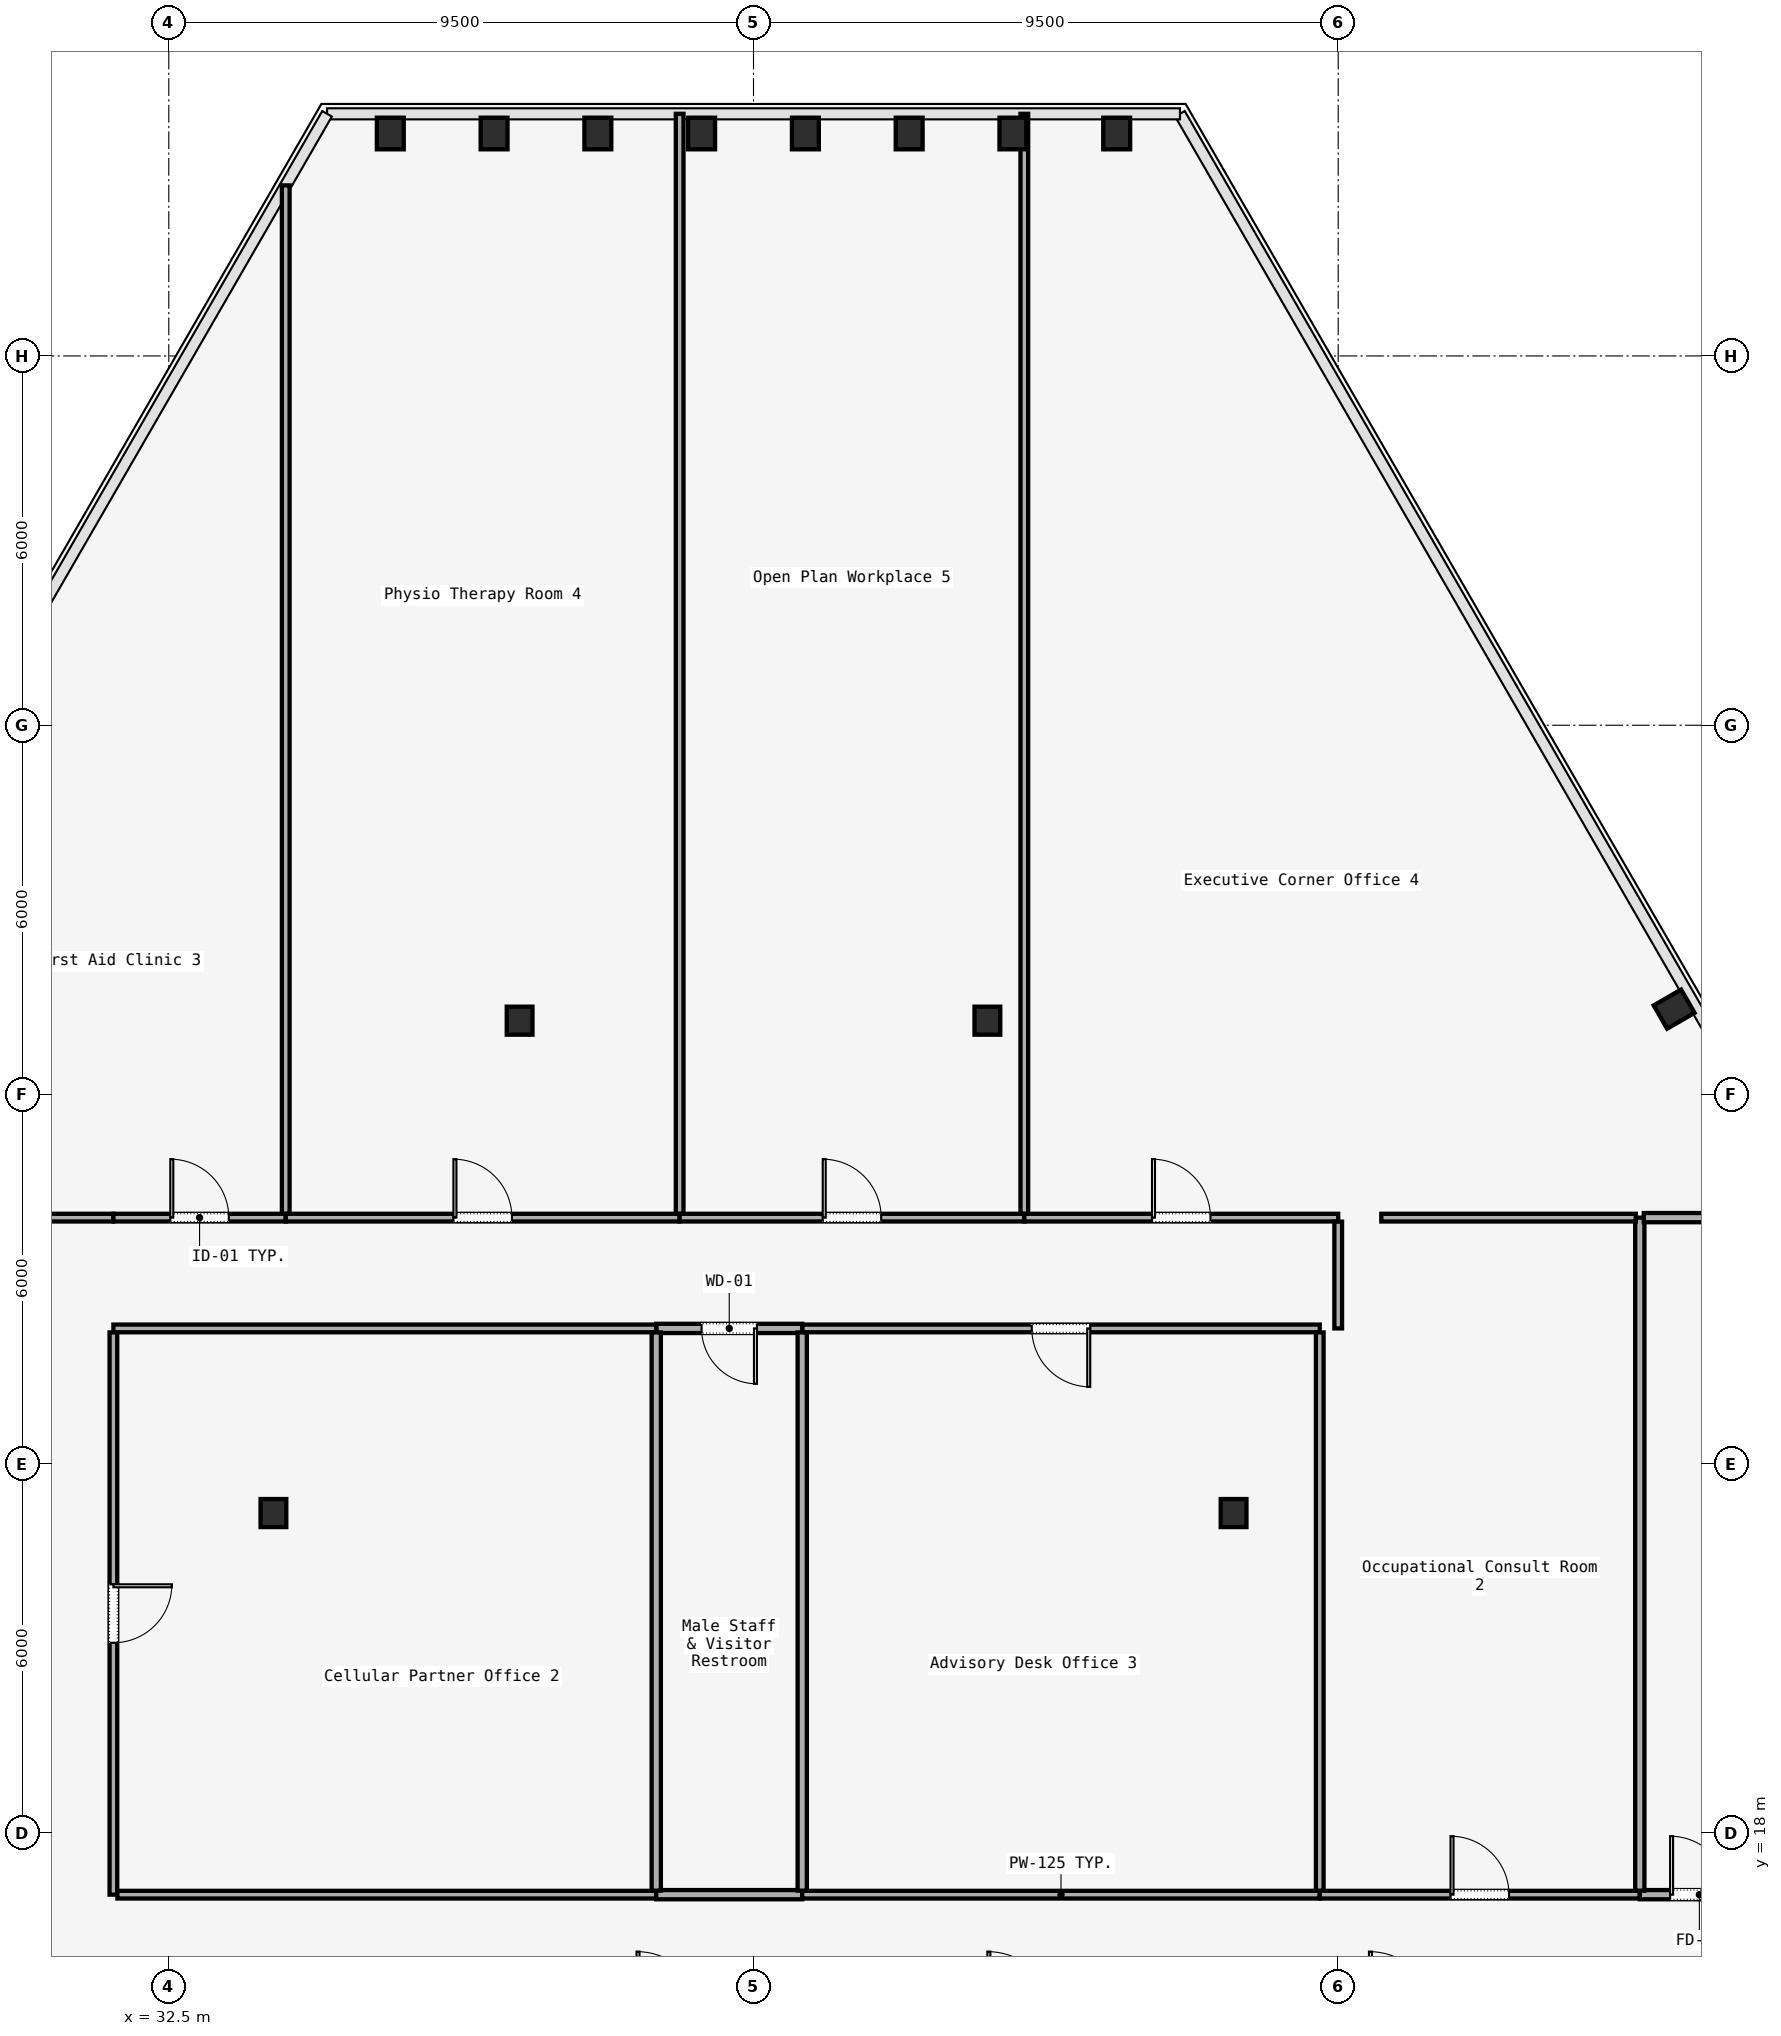
"""IFC4 building model, lengths in metres.
Left out: names, types, materials, properties, quantities, classifications, styles, units other than length and angle.
Written with IfcOpenShell. Run it as: python <this file> out.ifc"""

import sys

from ifc_helpers import new_model, si_unit, direction, frame, frame_2d, origin, origin_2d, place, context, subcontext, project, spatial, rectangle, i_section, extrude, element, fill, save


model = new_model("IFC4")
c1 = context("Model", 3, precision=1e-05, world=origin(), true_north=direction((0.0, 1.0)))
c2 = subcontext(c1, "Body", "Model", "MODEL_VIEW")
j1 = project(units=[si_unit("LENGTHUNIT", "METRE"), si_unit("PLANEANGLEUNIT", "RADIAN")], contexts=[c1])
p1 = place(None, origin())
s1 = spatial("IfcSite", under=j1, at=p1, CompositionType="ELEMENT")
p2 = place(p1, origin())
s2 = spatial("IfcBuilding", under=s1, at=p2, CompositionType="ELEMENT")
p3 = place(p2, frame((0.0, 0.0, 93.0)))
s3 = spatial("IfcBuildingStorey", under=s2, at=p3, CompositionType="ELEMENT", Elevation=93.0)
for number, where, z_axis, x_axis in (
    (1, (34.2, 23.2, 0.0), (0.0, 0.0, 1.0), (1.0, 0.0, 0.0)),
    (2, (49.8, 23.2, 0.0), (0.0, 0.0, 1.0), (1.0, 0.0, 0.0)),
    (3, (38.2, 31.2, 0.0), (0.0, 0.0, 1.0), (1.0, 0.0, 0.0)),
    (4, (45.8, 31.2, 0.0), (0.0, 0.0, 1.0), (1.0, 0.0, 0.0)),
):
    element("IfcColumn", number, at=place(p3, frame(where, z_axis=z_axis, x_axis=x_axis)), inside=s3, PredefinedType="COLUMN", context=c2, shape_type="SweptSolid", body=[
        extrude(i_section(OverallWidth=0.418, OverallDepth=0.456, WebThickness=0.042, FlangeThickness=0.067, FilletRadius=0.015, at=origin_2d()), origin(), (0.0, 0.0, 1.0), 3.58),
    ])
for number, where, z_axis, x_axis in (
    (5, (56.958, 31.387, 0.0), (0.0, 0.0, 1.0), (-0.5, 0.866, 0.0)),
    (6, (47.901, 45.614, 0.0), (0.0, 0.0, 1.0), (1.0, 0.0, 0.0)),
    (7, (46.215, 45.614, 0.0), (0.0, 0.0, 1.0), (1.0, 0.0, 0.0)),
    (8, (44.529, 45.614, 0.0), (0.0, 0.0, 1.0), (1.0, 0.0, 0.0)),
    (9, (42.843, 45.614, 0.0), (0.0, 0.0, 1.0), (1.0, 0.0, 0.0)),
    (10, (41.157, 45.614, 0.0), (0.0, 0.0, 1.0), (1.0, 0.0, 0.0)),
    (11, (39.471, 45.614, 0.0), (0.0, 0.0, 1.0), (1.0, 0.0, 0.0)),
    (12, (37.785, 45.614, 0.0), (0.0, 0.0, 1.0), (1.0, 0.0, 0.0)),
    (13, (36.099, 45.614, 0.0), (0.0, 0.0, 1.0), (1.0, 0.0, 0.0)),
):
    element("IfcColumn", number, at=place(p3, frame(where, z_axis=z_axis, x_axis=x_axis)), inside=s3, PredefinedType="COLUMN", context=c2, shape_type="SweptSolid", body=[
        extrude(i_section(OverallWidth=0.437, OverallDepth=0.514, WebThickness=0.061, FlangeThickness=0.077, FilletRadius=0.015, at=origin_2d()), origin(), (0.0, 0.0, 1.0), 3.58),
    ])
p4 = place(p3, frame((29.865, 28.0, 0.0), z_axis=(0.0, 0.0, 1.0), x_axis=(1.0, 0.0, 0.0)))
e14 = element("IfcWall", 14, at=p4, inside=s3, PredefinedType="PARTITIONING", context=c2, shape_type="SweptSolid", body=[
    extrude(rectangle(XDim=1.735, YDim=0.125, at=frame_2d((0.868, 0.0))), origin(), (0.0, 0.0, 1.0), 2.95),
])
p5 = place(p3, frame((31.6, 28.0, 0.0), z_axis=(0.0, 0.0, 1.0), x_axis=(1.0, 0.0, 0.0)))
e15 = element("IfcWall", 15, at=p5, inside=s3, PredefinedType="PARTITIONING", context=c2, shape_type="SweptSolid", body=[
    extrude(rectangle(XDim=2.8, YDim=0.125, at=frame_2d((1.4, 0.0))), origin(), (0.0, 0.0, 1.0), 2.95),
])
p6 = place(p5, frame((0.925, 0.0, 0.0)))
e16 = element("IfcOpeningElement", 16, at=p6, cuts=e15, PredefinedType="OPENING", context=c2, shape_type="SweptSolid", body=[
    extrude(rectangle(XDim=0.95, YDim=2.2, at=frame_2d((0.475, 1.1))), frame((0.0, 0.062, 0.0), z_axis=(0.0, -1.0, 0.0), x_axis=(1.0, 0.0, 0.0)), (0.0, 0.0, 1.0), 0.125),
])
p7 = place(p3, frame((34.4, 28.0, 0.0), z_axis=(0.0, 0.0, 1.0), x_axis=(1.0, 0.0, 0.0)))
e17 = element("IfcWall", 17, at=p7, inside=s3, PredefinedType="PARTITIONING", context=c2, shape_type="SweptSolid", body=[
    extrude(rectangle(XDim=6.4, YDim=0.125, at=frame_2d((3.2, 0.0))), origin(), (0.0, 0.0, 1.0), 2.95),
])
p8 = place(p7, frame((2.725, 0.0, 0.0)))
e18 = element("IfcOpeningElement", 18, at=p8, cuts=e17, PredefinedType="OPENING", context=c2, shape_type="SweptSolid", body=[
    extrude(rectangle(XDim=0.95, YDim=2.2, at=frame_2d((0.475, 1.1))), frame((0.0, 0.062, 0.0), z_axis=(0.0, -1.0, 0.0), x_axis=(1.0, 0.0, 0.0)), (0.0, 0.0, 1.0), 0.125),
])
p9 = place(p3, frame((40.8, 28.0, 0.0), z_axis=(0.0, 0.0, 1.0), x_axis=(1.0, 0.0, 0.0)))
e19 = element("IfcWall", 19, at=p9, inside=s3, PredefinedType="PARTITIONING", context=c2, shape_type="SweptSolid", body=[
    extrude(rectangle(XDim=5.6, YDim=0.125, at=frame_2d((2.8, 0.0))), origin(), (0.0, 0.0, 1.0), 2.95),
])
p10 = place(p9, frame((2.325, 0.0, 0.0)))
e20 = element("IfcOpeningElement", 20, at=p10, cuts=e19, PredefinedType="OPENING", context=c2, shape_type="SweptSolid", body=[
    extrude(rectangle(XDim=0.95, YDim=2.2, at=frame_2d((0.475, 1.1))), frame((0.0, 0.062, 0.0), z_axis=(0.0, -1.0, 0.0), x_axis=(1.0, 0.0, 0.0)), (0.0, 0.0, 1.0), 0.125),
])
p11 = place(p3, frame((46.4, 28.0, 0.0), z_axis=(0.0, 0.0, 1.0), x_axis=(1.0, 0.0, 0.0)))
e21 = element("IfcWall", 21, at=p11, inside=s3, PredefinedType="PARTITIONING", context=c2, shape_type="SweptSolid", body=[
    extrude(rectangle(XDim=5.1, YDim=0.125, at=frame_2d((2.55, 0.0))), origin(), (0.0, 0.0, 1.0), 2.95),
])
p12 = place(p11, frame((2.075, 0.0, 0.0)))
e22 = element("IfcOpeningElement", 22, at=p12, cuts=e21, PredefinedType="OPENING", context=c2, shape_type="SweptSolid", body=[
    extrude(rectangle(XDim=0.95, YDim=2.2, at=frame_2d((0.475, 1.1))), frame((0.0, 0.062, 0.0), z_axis=(0.0, -1.0, 0.0), x_axis=(1.0, 0.0, 0.0)), (0.0, 0.0, 1.0), 0.125),
])
p13 = place(p3, frame((51.5, 27.935, 0.0), z_axis=(0.0, 0.0, 1.0), x_axis=(0.0, -1.0, 0.0)))
e23 = element("IfcWall", 23, at=p13, inside=s3, PredefinedType="PARTITIONING", context=c2, shape_type="SweptSolid", body=[
    extrude(rectangle(XDim=1.735, YDim=0.125, at=frame_2d((0.868, 0.0))), origin(), (0.0, 0.0, 1.0), 2.95),
])
p14 = place(p3, frame((51.2, 26.2, 0.0), z_axis=(0.0, 0.0, 1.0), x_axis=(-1.0, 0.0, 0.0)))
e24 = element("IfcWall", 24, at=p14, inside=s3, PredefinedType="PARTITIONING", context=c2, shape_type="SweptSolid", body=[
    extrude(rectangle(XDim=8.408, YDim=0.125, at=frame_2d((4.204, 0.0))), origin(), (0.0, 0.0, 1.0), 2.95),
])
p15 = place(p14, frame((3.729, 0.0, 0.0)))
e25 = element("IfcOpeningElement", 25, at=p15, cuts=e24, PredefinedType="OPENING", context=c2, shape_type="SweptSolid", body=[
    extrude(rectangle(XDim=0.95, YDim=2.2, at=frame_2d((0.475, 1.1))), frame((0.0, 0.062, 0.0), z_axis=(0.0, -1.0, 0.0), x_axis=(1.0, 0.0, 0.0)), (0.0, 0.0, 1.0), 0.125),
])
p16 = place(p3, frame((42.792, 26.2, 0.0), z_axis=(0.0, 0.0, 1.0), x_axis=(-1.0, 0.0, 0.0)))
e26 = element("IfcWall", 26, at=p16, inside=s3, PredefinedType="PARTITIONING", context=c2, shape_type="SweptSolid", body=[
    extrude(rectangle(XDim=2.372, YDim=0.15, at=frame_2d((1.186, 0.0))), origin(), (0.0, 0.0, 1.0), 2.95),
])
p17 = place(p16, frame((0.736, 0.0, 0.0)))
e27 = element("IfcOpeningElement", 27, at=p17, cuts=e26, PredefinedType="OPENING", context=c2, shape_type="SweptSolid", body=[
    extrude(rectangle(XDim=0.9, YDim=2.15, at=frame_2d((0.45, 1.075))), frame((0.0, 0.075, 0.0), z_axis=(0.0, -1.0, 0.0), x_axis=(1.0, 0.0, 0.0)), (0.0, 0.0, 1.0), 0.15),
])
p18 = place(p3, frame((40.42, 26.2, 0.0), z_axis=(0.0, 0.0, 1.0), x_axis=(-1.0, 0.0, 0.0)))
e28 = element("IfcWall", 28, at=p18, inside=s3, PredefinedType="PARTITIONING", context=c2, shape_type="SweptSolid", body=[
    extrude(rectangle(XDim=8.82, YDim=0.125, at=frame_2d((4.41, 0.0))), origin(), (0.0, 0.0, 1.0), 2.95),
])
p19 = place(p3, frame((31.6, 26.135, 0.0), z_axis=(0.0, 0.0, 1.0), x_axis=(0.0, -1.0, 0.0)))
e29 = element("IfcWall", 29, at=p19, inside=s3, PredefinedType="PARTITIONING", context=c2, shape_type="SweptSolid", body=[
    extrude(rectangle(XDim=9.135, YDim=0.125, at=frame_2d((4.567, 0.0))), origin(), (0.0, 0.0, 1.0), 2.95),
])
p20 = place(p19, frame((4.093, 0.0, 0.0)))
e30 = element("IfcOpeningElement", 30, at=p20, cuts=e29, PredefinedType="OPENING", context=c2, shape_type="SweptSolid", body=[
    extrude(rectangle(XDim=0.95, YDim=2.2, at=frame_2d((0.475, 1.1))), frame((0.0, 0.062, 0.0), z_axis=(0.0, -1.0, 0.0), x_axis=(1.0, 0.0, 0.0)), (0.0, 0.0, 1.0), 0.125),
])
p21 = place(p3, frame((31.665, 17.0, 0.0), z_axis=(0.0, 0.0, 1.0), x_axis=(1.0, 0.0, 0.0)))
e31 = element("IfcWall", 31, at=p21, inside=s3, PredefinedType="PARTITIONING", context=c2, shape_type="SweptSolid", body=[
    extrude(rectangle(XDim=8.755, YDim=0.125, at=frame_2d((4.377, 0.0))), origin(), (0.0, 0.0, 1.0), 2.95),
])
p22 = place(p3, frame((40.42, 17.0, 0.0), z_axis=(0.0, 0.0, 1.0), x_axis=(1.0, 0.0, 0.0)))
e32 = element("IfcWall", 32, at=p22, inside=s3, PredefinedType="PARTITIONING", context=c2, shape_type="SweptSolid", body=[
    extrude(rectangle(XDim=2.372, YDim=0.15, at=frame_2d((1.186, 0.0))), origin(), (0.0, 0.0, 1.0), 2.95),
])
p23 = place(p3, frame((42.792, 17.0, 0.0), z_axis=(0.0, 0.0, 1.0), x_axis=(1.0, 0.0, 0.0)))
e33 = element("IfcWall", 33, at=p23, inside=s3, PredefinedType="PARTITIONING", context=c2, shape_type="SweptSolid", body=[
    extrude(rectangle(XDim=8.408, YDim=0.125, at=frame_2d((4.204, 0.0))), origin(), (0.0, 0.0, 1.0), 2.95),
])
p24 = place(p3, frame((51.2, 17.0, 0.0), z_axis=(0.0, 0.0, 1.0), x_axis=(1.0, 0.0, 0.0)))
e34 = element("IfcWall", 34, at=p24, inside=s3, PredefinedType="PARTITIONING", context=c2, shape_type="SweptSolid", body=[
    extrude(rectangle(XDim=5.2, YDim=0.125, at=frame_2d((2.6, 0.0))), origin(), (0.0, 0.0, 1.0), 2.95),
])
p25 = place(p24, frame((2.125, 0.0, 0.0)))
e35 = element("IfcOpeningElement", 35, at=p25, cuts=e34, PredefinedType="OPENING", context=c2, shape_type="SweptSolid", body=[
    extrude(rectangle(XDim=0.95, YDim=2.2, at=frame_2d((0.475, 1.1))), frame((0.0, 0.062, 0.0), z_axis=(0.0, -1.0, 0.0), x_axis=(1.0, 0.0, 0.0)), (0.0, 0.0, 1.0), 0.125),
])
p26 = place(p3, frame((56.4, 17.0, 0.0), z_axis=(0.0, 0.0, 1.0), x_axis=(1.0, 0.0, 0.0)))
e36 = element("IfcWall", 36, at=p26, inside=s3, PredefinedType="PARTITIONING", context=c2, shape_type="SweptSolid", body=[
    extrude(rectangle(XDim=1.935, YDim=0.15, at=frame_2d((0.968, 0.0))), origin(), (0.0, 0.0, 1.0), 2.95),
])
p27 = place(p26, frame((0.492, 0.0, 0.0)))
e37 = element("IfcOpeningElement", 37, at=p27, cuts=e36, PredefinedType="OPENING", context=c2, shape_type="SweptSolid", body=[
    extrude(rectangle(XDim=0.95, YDim=2.2, at=frame_2d((0.475, 1.1))), frame((0.0, 0.075, 0.0), z_axis=(0.0, -1.0, 0.0), x_axis=(1.0, 0.0, 0.0)), (0.0, 0.0, 1.0), 0.15),
])
p28 = place(p3, frame((56.4, 17.065, 0.0), z_axis=(0.0, 0.0, 1.0), x_axis=(0.0, 1.0, 0.0)))
e38 = element("IfcWall", 38, at=p28, inside=s3, PredefinedType="PARTITIONING", context=c2, shape_type="SweptSolid", body=[
    extrude(rectangle(XDim=10.935, YDim=0.15, at=frame_2d((5.468, 0.0))), origin(), (0.0, 0.0, 1.0), 2.95),
])
p29 = place(p3, frame((56.465, 28.0, 0.0), z_axis=(0.0, 0.0, 1.0), x_axis=(1.0, 0.0, 0.0)))
e39 = element("IfcWall", 39, at=p29, inside=s3, PredefinedType="PARTITIONING", context=c2, shape_type="SweptSolid", body=[
    extrude(rectangle(XDim=2.818, YDim=0.15, at=frame_2d((1.409, 0.0))), origin(), (0.0, 0.0, 1.0), 2.95),
])
for number, where, z_axis, x_axis in (
    (40, (40.42, 26.135, 0.0), (0.0, 0.0, 1.0), (0.0, -1.0, 0.0)),
    (41, (42.792, 26.135, 0.0), (0.0, 0.0, 1.0), (0.0, -1.0, 0.0)),
):
    element("IfcWall", number, at=place(p3, frame(where, z_axis=z_axis, x_axis=x_axis)), inside=s3, PredefinedType="PARTITIONING", context=c2, shape_type="SweptSolid", body=[
        extrude(rectangle(XDim=9.07, YDim=0.15, at=frame_2d((4.535, 0.0))), origin(), (0.0, 0.0, 1.0), 2.95),
    ])
p30 = place(p3, frame((51.2, 26.135, 0.0), z_axis=(0.0, 0.0, 1.0), x_axis=(0.0, -1.0, 0.0)))
e42 = element("IfcWall", 42, at=p30, inside=s3, PredefinedType="PARTITIONING", context=c2, shape_type="SweptSolid", body=[
    extrude(rectangle(XDim=9.07, YDim=0.125, at=frame_2d((4.535, 0.0))), origin(), (0.0, 0.0, 1.0), 2.95),
])
p31 = place(p3, frame((52.2, 28.0, 0.0), z_axis=(0.0, 0.0, 1.0), x_axis=(1.0, 0.0, 0.0)))
e43 = element("IfcWall", 43, at=p31, inside=s3, PredefinedType="PARTITIONING", context=c2, shape_type="SweptSolid", body=[
    extrude(rectangle(XDim=4.135, YDim=0.125, at=frame_2d((2.067, 0.0))), origin(), (0.0, 0.0, 1.0), 2.95),
])
p32 = place(p3, frame((34.4, 44.771, 0.0), z_axis=(0.0, 0.0, 1.0), x_axis=(0.0, -1.0, 0.0)))
e44 = element("IfcWall", 44, at=p32, inside=s3, PredefinedType="PARTITIONING", context=c2, shape_type="SweptSolid", body=[
    extrude(rectangle(XDim=16.706, YDim=0.125, at=frame_2d((8.353, 0.0))), origin(), (0.0, 0.0, 1.0), 2.95),
])
for number, where, z_axis, x_axis in (
    (45, (46.4, 28.065, 0.0), (0.0, 0.0, 1.0), (0.0, 1.0, 0.0)),
    (46, (40.8, 45.934, 0.0), (0.0, 0.0, 1.0), (0.0, -1.0, 0.0)),
):
    element("IfcWall", number, at=place(p3, frame(where, z_axis=z_axis, x_axis=x_axis)), inside=s3, PredefinedType="PARTITIONING", context=c2, shape_type="SweptSolid", body=[
        extrude(rectangle(XDim=17.869, YDim=0.125, at=frame_2d((8.935, 0.0))), origin(), (0.0, 0.0, 1.0), 2.95),
    ])
p33 = place(p27, origin())
e47 = element("IfcDoor", 47, at=p33, inside=s3, OperationType="SINGLE_SWING_LEFT", PredefinedType="DOOR", context=c2, shape_type="SweptSolid", body=[
    extrude(rectangle(XDim=0.95, YDim=2.2, at=frame_2d((0.475, 1.1))), frame((0.0, 0.025, 0.0), z_axis=(0.0, -1.0, 0.0), x_axis=(1.0, 0.0, 0.0)), (0.0, 0.0, 1.0), 0.05),
])
fill(e37, e47)
p34 = place(p20, origin())
e48 = element("IfcDoor", 48, at=p34, inside=s3, OperationType="SINGLE_SWING_RIGHT", PredefinedType="DOOR", context=c2, shape_type="SweptSolid", body=[
    extrude(rectangle(XDim=0.95, YDim=2.2, at=frame_2d((0.475, 1.1))), frame((0.0, 0.025, 0.0), z_axis=(0.0, -1.0, 0.0), x_axis=(1.0, 0.0, 0.0)), (0.0, 0.0, 1.0), 0.05),
])
fill(e30, e48)
p35 = place(p17, origin())
e49 = element("IfcDoor", 49, at=p35, inside=s3, OperationType="SINGLE_SWING_LEFT", PredefinedType="DOOR", context=c2, shape_type="SweptSolid", body=[
    extrude(rectangle(XDim=0.9, YDim=2.15, at=frame_2d((0.45, 1.075))), frame((0.0, 0.025, 0.0), z_axis=(0.0, -1.0, 0.0), x_axis=(1.0, 0.0, 0.0)), (0.0, 0.0, 1.0), 0.05),
])
fill(e27, e49)
p36 = place(p15, origin())
e50 = element("IfcDoor", 50, at=p36, inside=s3, OperationType="SINGLE_SWING_RIGHT", PredefinedType="DOOR", context=c2, shape_type="SweptSolid", body=[
    extrude(rectangle(XDim=0.95, YDim=2.2, at=frame_2d((0.475, 1.1))), frame((0.0, 0.025, 0.0), z_axis=(0.0, -1.0, 0.0), x_axis=(1.0, 0.0, 0.0)), (0.0, 0.0, 1.0), 0.05),
])
fill(e25, e50)
p37 = place(p25, origin())
e51 = element("IfcDoor", 51, at=p37, inside=s3, OperationType="SINGLE_SWING_LEFT", PredefinedType="DOOR", context=c2, shape_type="SweptSolid", body=[
    extrude(rectangle(XDim=0.95, YDim=2.2, at=frame_2d((0.475, 1.1))), frame((0.0, 0.025, 0.0), z_axis=(0.0, -1.0, 0.0), x_axis=(1.0, 0.0, 0.0)), (0.0, 0.0, 1.0), 0.05),
])
fill(e35, e51)
p38 = place(p6, origin())
e52 = element("IfcDoor", 52, at=p38, inside=s3, OperationType="SINGLE_SWING_LEFT", PredefinedType="DOOR", context=c2, shape_type="SweptSolid", body=[
    extrude(rectangle(XDim=0.95, YDim=2.2, at=frame_2d((0.475, 1.1))), frame((0.0, 0.025, 0.0), z_axis=(0.0, -1.0, 0.0), x_axis=(1.0, 0.0, 0.0)), (0.0, 0.0, 1.0), 0.05),
])
fill(e16, e52)
p39 = place(p12, origin())
e53 = element("IfcDoor", 53, at=p39, inside=s3, OperationType="SINGLE_SWING_RIGHT", PredefinedType="DOOR", context=c2, shape_type="SweptSolid", body=[
    extrude(rectangle(XDim=0.95, YDim=2.2, at=frame_2d((0.475, 1.1))), frame((0.0, 0.025, 0.0), z_axis=(0.0, -1.0, 0.0), x_axis=(1.0, 0.0, 0.0)), (0.0, 0.0, 1.0), 0.05),
])
fill(e22, e53)
p40 = place(p8, origin())
e54 = element("IfcDoor", 54, at=p40, inside=s3, OperationType="SINGLE_SWING_LEFT", PredefinedType="DOOR", context=c2, shape_type="SweptSolid", body=[
    extrude(rectangle(XDim=0.95, YDim=2.2, at=frame_2d((0.475, 1.1))), frame((0.0, 0.025, 0.0), z_axis=(0.0, -1.0, 0.0), x_axis=(1.0, 0.0, 0.0)), (0.0, 0.0, 1.0), 0.05),
])
fill(e18, e54)
p41 = place(p10, origin())
e55 = element("IfcDoor", 55, at=p41, inside=s3, OperationType="SINGLE_SWING_RIGHT", PredefinedType="DOOR", context=c2, shape_type="SweptSolid", body=[
    extrude(rectangle(XDim=0.95, YDim=2.2, at=frame_2d((0.475, 1.1))), frame((0.0, 0.025, 0.0), z_axis=(0.0, -1.0, 0.0), x_axis=(1.0, 0.0, 0.0)), (0.0, 0.0, 1.0), 0.05),
])
fill(e20, e55)
save(model, sys.argv[1])
